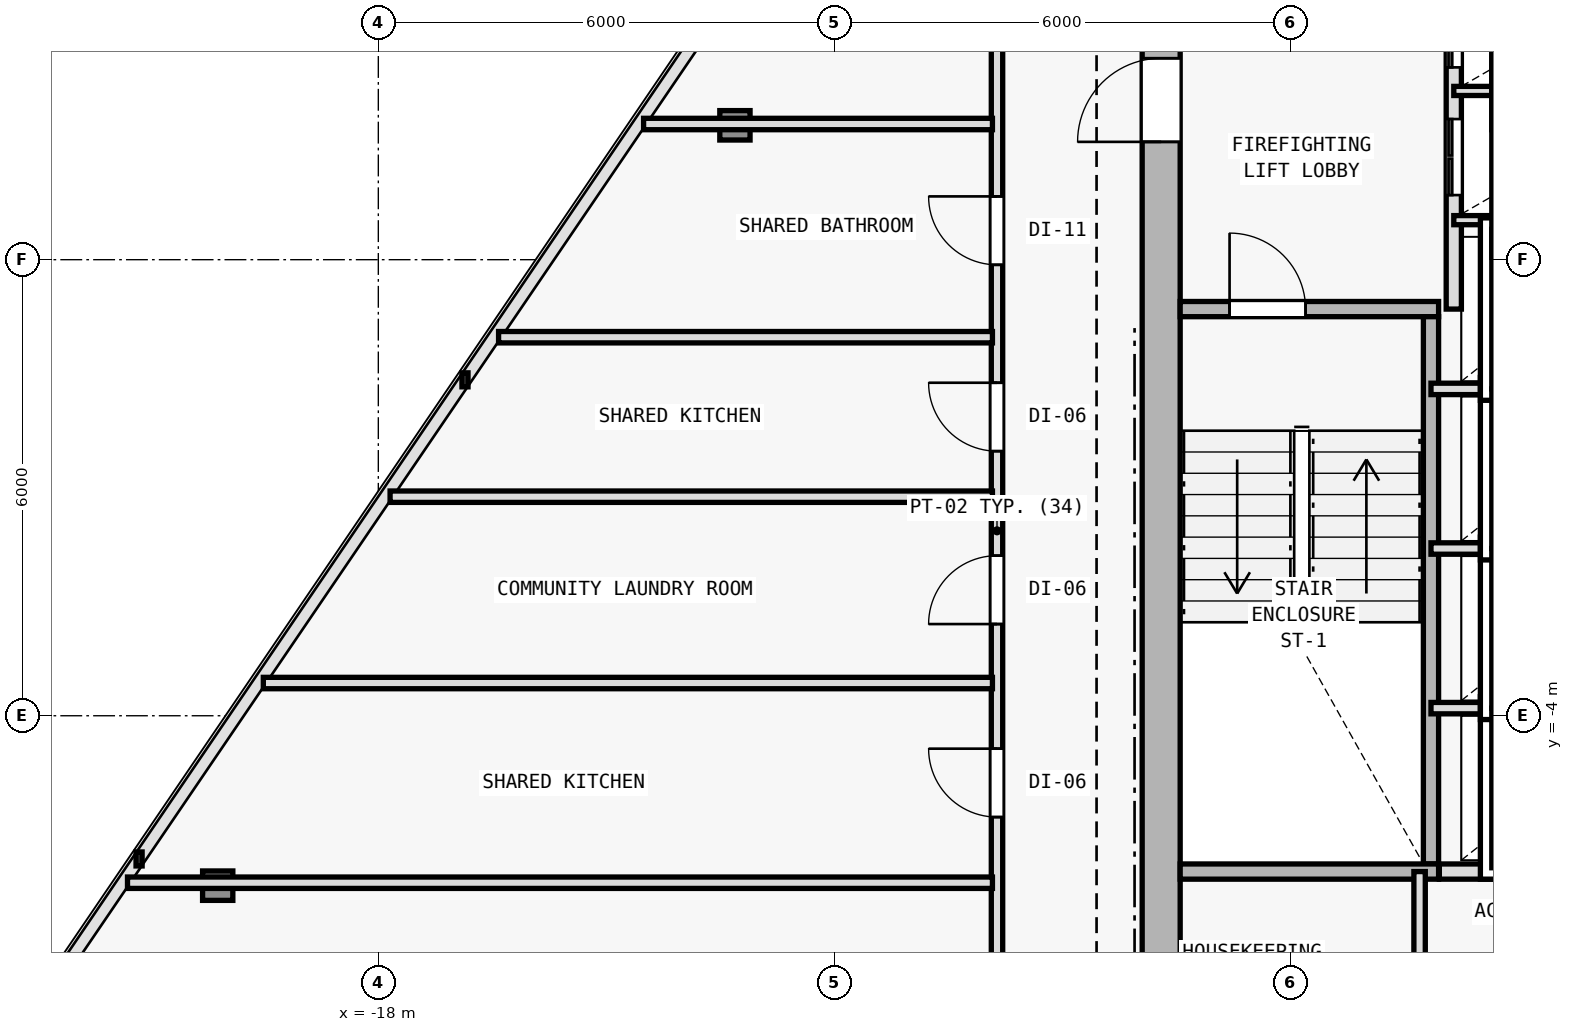
"""IFC4 building model, lengths in metres.
Left out: names, types, materials, properties, quantities, classifications, styles, units other than length and angle.
Written with IfcOpenShell. Run it as: python <this file> out.ifc"""

import sys

from ifc_helpers import new_model, si_unit, direction, frame, frame_2d, origin, origin_2d, place, context, subcontext, project, spatial, rectangle, i_section, extrude, element, fill, save


model = new_model("IFC4")
c1 = context("Model", 3, precision=1e-05, world=origin(), true_north=direction((0.0, 1.0)))
c2 = subcontext(c1, "Body", "Model", "MODEL_VIEW")
j1 = project(units=[si_unit("LENGTHUNIT", "METRE"), si_unit("PLANEANGLEUNIT", "RADIAN")], contexts=[c1])
p1 = place(None, origin())
s1 = spatial("IfcSite", under=j1, at=p1, CompositionType="ELEMENT")
p2 = place(p1, origin())
s2 = spatial("IfcBuilding", under=s1, at=p2, CompositionType="ELEMENT")
p3 = place(p2, frame((0.0, 0.0, 201.9)))
s3 = spatial("IfcBuildingStorey", under=s2, at=p3, CompositionType="ELEMENT", Elevation=201.9)
p4 = place(p3, frame((-7.7, 2.0, 0.0), z_axis=(0.0, 0.0, 1.0), x_axis=(1.0, 0.0, 0.0)))
e1 = element("IfcColumn", 1, at=p4, inside=s3, PredefinedType="COLUMN", context=c2, shape_type="SweptSolid", body=[
    extrude(i_section(OverallWidth=0.398, OverallDepth=0.387, WebThickness=0.013, FlangeThickness=0.022, FilletRadius=0.015, at=origin_2d()), origin(), (0.0, 0.0, 1.0), 3.6),
])
p5 = place(p3, frame((-13.308, 3.768, 0.006), z_axis=(0.017071567417, 0.009521989794, 0.999808928394), x_axis=(-0.487119351792, 0.873335409284, 0.0)))
e2 = element("IfcColumn", 2, at=p5, inside=s3, PredefinedType="COLUMN", context=c2, shape_type="SweptSolid", body=[
    extrude(i_section(OverallWidth=0.398, OverallDepth=0.387, WebThickness=0.013, FlangeThickness=0.022, FilletRadius=0.015, at=origin_2d()), origin(), (0.0, 0.0, 1.0), 3.59),
])
p6 = place(p3, frame((-20.113, -6.236, 0.006), z_axis=(0.025224163578, 0.021620711639, 0.999447990843), x_axis=(-0.650791373456, 0.759256602365, 0.0)))
e3 = element("IfcColumn", 3, at=p6, inside=s3, PredefinedType="COLUMN", context=c2, shape_type="SweptSolid", body=[
    extrude(i_section(OverallWidth=0.398, OverallDepth=0.387, WebThickness=0.013, FlangeThickness=0.022, FilletRadius=0.015, at=origin_2d()), origin(), (0.0, 0.0, 1.0), 3.591),
])
p7 = place(p3, frame((-7.7, -9.15, 0.0), z_axis=(0.0, 0.0, 1.0), x_axis=(0.0, 1.0, 0.0)))
e4 = element("IfcWall", 4, at=p7, inside=s3, PredefinedType="SHEAR", context=c2, shape_type="SweptSolid", body=[
    extrude(rectangle(XDim=19.1, YDim=0.5, at=frame_2d((9.55, 0.0))), origin(), (0.0, 0.0, 1.0), 3.35),
])
p8 = place(p7, frame((12.7, 0.0, 0.0)))
e5 = element("IfcOpeningElement", 5, at=p8, cuts=e4, PredefinedType="OPENING", context=c2, shape_type="SweptSolid", body=[
    extrude(rectangle(XDim=1.1, YDim=2.15, at=frame_2d((0.55, 1.075))), frame((0.0, 0.26, 0.0), z_axis=(0.0, -1.0, 0.0), x_axis=(1.0, 0.0, 0.0)), (0.0, 0.0, 1.0), 0.52),
])
p9 = place(p3, frame((-7.45, 1.35, 0.0), z_axis=(0.0, 0.0, 1.0), x_axis=(1.0, 0.0, 0.0)))
e6 = element("IfcWall", 6, at=p9, inside=s3, PredefinedType="SOLIDWALL", context=c2, shape_type="SweptSolid", body=[
    extrude(rectangle(XDim=3.4, YDim=0.2, at=frame_2d((1.7, 0.0))), origin(), (0.0, 0.0, 1.0), 3.35),
])
p10 = place(p9, frame((0.65, 0.0, 0.0)))
e7 = element("IfcOpeningElement", 7, at=p10, cuts=e6, PredefinedType="OPENING", context=c2, shape_type="SweptSolid", body=[
    extrude(rectangle(XDim=1.0, YDim=2.15, at=frame_2d((0.5, 1.075))), frame((0.0, 0.11, 0.0), z_axis=(0.0, -1.0, 0.0), x_axis=(1.0, 0.0, 0.0)), (0.0, 0.0, 1.0), 0.22),
])
p11 = place(p3, frame((-4.15, -5.95, 0.0), z_axis=(0.0, 0.0, 1.0), x_axis=(0.0, 1.0, 0.0)))
e8 = element("IfcWall", 8, at=p11, inside=s3, PredefinedType="SOLIDWALL", context=c2, shape_type="SweptSolid", body=[
    extrude(rectangle(XDim=7.2, YDim=0.2, at=frame_2d((3.6, 0.0))), origin(), (0.0, 0.0, 1.0), 3.35),
])
p12 = place(p3, frame((-3.85, 1.35, 0.0), z_axis=(0.0, 0.0, 1.0), x_axis=(0.0, 1.0, 0.0)))
e9 = element("IfcWall", 9, at=p12, inside=s3, PredefinedType="SOLIDWALL", context=c2, shape_type="SweptSolid", body=[
    extrude(rectangle(XDim=8.595, YDim=0.2, at=frame_2d((4.297, 0.0))), origin(), (0.0, 0.0, 1.0), 3.35),
])
p13 = place(p12, frame((1.5, 0.0, 0.0)))
e10 = element("IfcOpeningElement", 10, at=p13, cuts=e9, PredefinedType="OPENING", context=c2, shape_type="SweptSolid", body=[
    extrude(rectangle(XDim=1.0, YDim=2.15, at=frame_2d((0.5, 1.075))), frame((0.0, 0.11, 0.0), z_axis=(0.0, -1.0, 0.0), x_axis=(1.0, 0.0, 0.0)), (0.0, 0.0, 1.0), 0.22),
])
p14 = place(p12, frame((3.18, 0.0, 0.0)))
e11 = element("IfcOpeningElement", 11, at=p14, cuts=e9, PredefinedType="OPENING", context=c2, shape_type="SweptSolid", body=[
    extrude(rectangle(XDim=1.0, YDim=2.15, at=frame_2d((0.5, 1.075))), frame((0.0, 0.11, 0.0), z_axis=(0.0, -1.0, 0.0), x_axis=(1.0, 0.0, 0.0)), (0.0, 0.0, 1.0), 0.22),
])
for number, where, z_axis, x_axis in (
    (12, (-3.85, 2.52, 0.0), (0.0, 0.0, 1.0), (1.0, 0.0, 0.0)),
    (13, (-3.85, 4.22, 0.0), (0.0, 0.0, 1.0), (1.0, 0.0, 0.0)),
):
    element("IfcWall", number, at=place(p3, frame(where, z_axis=z_axis, x_axis=x_axis)), inside=s3, PredefinedType="PARTITIONING", context=c2, shape_type="SweptSolid", body=[
        extrude(rectangle(XDim=2.9, YDim=0.12, at=frame_2d((1.45, 0.0))), origin(), (0.0, 0.0, 1.0), 3.35),
    ])
for number, where, z_axis, x_axis in (
    (14, (-4.15, -3.9, 0.0), (0.0, 0.0, 1.0), (1.0, 0.0, 0.0)),
    (15, (-4.15, -1.8, 0.0), (0.0, 0.0, 1.0), (1.0, 0.0, 0.0)),
    (16, (-4.15, 0.3, 0.0), (0.0, 0.0, 1.0), (1.0, 0.0, 0.0)),
):
    element("IfcWall", number, at=place(p3, frame(where, z_axis=z_axis, x_axis=x_axis)), inside=s3, PredefinedType="PARTITIONING", context=c2, shape_type="SweptSolid", body=[
        extrude(rectangle(XDim=2.9, YDim=0.15, at=frame_2d((1.45, 0.0))), origin(), (0.0, 0.0, 1.0), 3.35),
    ])
p15 = place(p3, frame((-7.45, -6.05, 0.0), z_axis=(0.0, 0.0, 1.0), x_axis=(1.0, 0.0, 0.0)))
e17 = element("IfcWall", 17, at=p15, inside=s3, PredefinedType="SOLIDWALL", context=c2, shape_type="SweptSolid", body=[
    extrude(rectangle(XDim=3.4, YDim=0.2, at=frame_2d((1.7, 0.0))), origin(), (0.0, 0.0, 1.0), 3.35),
])
p16 = place(p3, frame((-4.04, -6.05, 0.0), z_axis=(0.0, 0.0, 1.0), x_axis=(1.0, 0.0, 0.0)))
e18 = element("IfcWall", 18, at=p16, inside=s3, PredefinedType="SOLIDWALL", context=c2, shape_type="SweptSolid", body=[
    extrude(rectangle(XDim=2.79, YDim=0.2, at=frame_2d((1.395, 0.0))), origin(), (0.0, 0.0, 1.0), 3.35),
])
p17 = place(p3, frame((-4.3, -9.145, 0.0), z_axis=(0.0, 0.0, 1.0), x_axis=(0.0, 1.0, 0.0)))
e19 = element("IfcWall", 19, at=p17, inside=s3, PredefinedType="PARTITIONING", context=c2, shape_type="SweptSolid", body=[
    extrude(rectangle(XDim=3.095, YDim=0.15, at=frame_2d((1.547, 0.0))), origin(), (0.0, 0.0, 1.0), 3.35),
])
p18 = place(p17, frame((0.845, 0.0, 0.0)))
e20 = element("IfcOpeningElement", 20, at=p18, cuts=e19, PredefinedType="OPENING", context=c2, shape_type="SweptSolid", body=[
    extrude(rectangle(XDim=0.9, YDim=2.1, at=frame_2d((0.45, 1.05))), frame((0.0, 0.085, 0.0), z_axis=(0.0, -1.0, 0.0), x_axis=(1.0, 0.0, 0.0)), (0.0, 0.0, 1.0), 0.17),
])
p19 = place(p3, frame((-9.86, -11.56, 0.0), z_axis=(0.0, 0.0, 1.0), x_axis=(0.0, 1.0, 0.0)))
e21 = element("IfcWall", 21, at=p19, inside=s3, PredefinedType="PARTITIONING", context=c2, shape_type="SweptSolid", body=[
    extrude(rectangle(XDim=19.986, YDim=0.15, at=frame_2d((9.993, 0.0))), origin(), (0.0, 0.0, 1.0), 2.775),
])
p20 = place(p19, frame((11.041, 0.0, 0.0)))
e22 = element("IfcOpeningElement", 22, at=p20, cuts=e21, PredefinedType="OPENING", context=c2, shape_type="SweptSolid", body=[
    extrude(rectangle(XDim=0.9, YDim=2.1, at=frame_2d((0.45, 1.05))), frame((0.0, 0.085, 0.0), z_axis=(0.0, -1.0, 0.0), x_axis=(1.0, 0.0, 0.0)), (0.0, 0.0, 1.0), 0.17),
])
p21 = place(p19, frame((8.766, 0.0, 0.0)))
e23 = element("IfcOpeningElement", 23, at=p21, cuts=e21, PredefinedType="OPENING", context=c2, shape_type="SweptSolid", body=[
    extrude(rectangle(XDim=0.9, YDim=2.1, at=frame_2d((0.45, 1.05))), frame((0.0, 0.085, 0.0), z_axis=(0.0, -1.0, 0.0), x_axis=(1.0, 0.0, 0.0)), (0.0, 0.0, 1.0), 0.17),
])
p22 = place(p19, frame((6.227, 0.0, 0.0)))
e24 = element("IfcOpeningElement", 24, at=p22, cuts=e21, PredefinedType="OPENING", context=c2, shape_type="SweptSolid", body=[
    extrude(rectangle(XDim=0.9, YDim=2.1, at=frame_2d((0.45, 1.05))), frame((0.0, 0.085, 0.0), z_axis=(0.0, -1.0, 0.0), x_axis=(1.0, 0.0, 0.0)), (0.0, 0.0, 1.0), 0.17),
])
p23 = place(p19, frame((2.321, 0.0, 0.0)))
e25 = element("IfcOpeningElement", 25, at=p23, cuts=e21, PredefinedType="OPENING", context=c2, shape_type="SweptSolid", body=[
    extrude(rectangle(XDim=0.9, YDim=2.1, at=frame_2d((0.45, 1.05))), frame((0.0, 0.085, 0.0), z_axis=(0.0, -1.0, 0.0), x_axis=(1.0, 0.0, 0.0)), (0.0, 0.0, 1.0), 0.17),
])
p24 = place(p19, frame((13.492, 0.0, 0.0)))
e26 = element("IfcOpeningElement", 26, at=p24, cuts=e21, PredefinedType="OPENING", context=c2, shape_type="SweptSolid", body=[
    extrude(rectangle(XDim=0.9, YDim=2.1, at=frame_2d((0.45, 1.05))), frame((0.0, 0.085, 0.0), z_axis=(0.0, -1.0, 0.0), x_axis=(1.0, 0.0, 0.0)), (0.0, 0.0, 1.0), 0.17),
])
p25 = place(p3, frame((-9.92, 3.785, 0.0), z_axis=(0.0, 0.0, 1.0), x_axis=(-1.0, 0.0, 0.0)))
e27 = element("IfcWall", 27, at=p25, inside=s3, PredefinedType="PARTITIONING", context=c2, shape_type="SweptSolid", body=[
    extrude(rectangle(XDim=4.59, YDim=0.15, at=frame_2d((2.295, 0.0))), origin(), (0.0, 0.0, 1.0), 2.935),
])
p26 = place(p3, frame((-9.92, -6.197, 0.0), z_axis=(0.0, 0.0, 1.0), x_axis=(-1.0, 0.0, 0.0)))
e28 = element("IfcWall", 28, at=p26, inside=s3, PredefinedType="PARTITIONING", context=c2, shape_type="SweptSolid", body=[
    extrude(rectangle(XDim=11.38, YDim=0.15, at=frame_2d((5.69, 0.0))), origin(), (0.0, 0.0, 1.0), 2.725),
])
p27 = place(p3, frame((-9.92, -1.118, 0.0), z_axis=(0.0, 0.0, 1.0), x_axis=(-1.0, 0.0, 0.0)))
e29 = element("IfcWall", 29, at=p27, inside=s3, PredefinedType="PARTITIONING", context=c2, shape_type="SweptSolid", body=[
    extrude(rectangle(XDim=7.925, YDim=0.15, at=frame_2d((3.963, 0.0))), origin(), (0.0, 0.0, 1.0), 2.725),
])
p28 = place(p3, frame((-9.92, -3.57, 0.0), z_axis=(0.0, 0.0, 1.0), x_axis=(-1.0, 0.0, 0.0)))
e30 = element("IfcWall", 30, at=p28, inside=s3, PredefinedType="PARTITIONING", context=c2, shape_type="SweptSolid", body=[
    extrude(rectangle(XDim=9.593, YDim=0.15, at=frame_2d((4.796, 0.0))), origin(), (0.0, 0.0, 1.0), 2.725),
])
p29 = place(p3, frame((-9.92, 0.98, 0.0), z_axis=(0.0, 0.0, 1.0), x_axis=(-1.0, 0.0, 0.0)))
e31 = element("IfcWall", 31, at=p29, inside=s3, PredefinedType="PARTITIONING", context=c2, shape_type="SweptSolid", body=[
    extrude(rectangle(XDim=6.498, YDim=0.15, at=frame_2d((3.249, 0.0))), origin(), (0.0, 0.0, 1.0), 2.725),
])
p30 = place(p8, origin())
e32 = element("IfcDoor", 32, at=p30, inside=s3, OperationType="SINGLE_SWING_LEFT", PredefinedType="DOOR", context=c2, shape_type="SweptSolid", body=[
    extrude(rectangle(XDim=1.1, YDim=2.15, at=frame_2d((0.55, 1.075))), frame((0.0, 0.025, 0.0), z_axis=(0.0, -1.0, 0.0), x_axis=(1.0, 0.0, 0.0)), (0.0, 0.0, 1.0), 0.05),
])
fill(e5, e32)
p31 = place(p10, origin())
e33 = element("IfcDoor", 33, at=p31, inside=s3, OperationType="SINGLE_SWING_LEFT", PredefinedType="DOOR", context=c2, shape_type="SweptSolid", body=[
    extrude(rectangle(XDim=1.0, YDim=2.15, at=frame_2d((0.5, 1.075))), frame((0.0, 0.025, 0.0), z_axis=(0.0, -1.0, 0.0), x_axis=(1.0, 0.0, 0.0)), (0.0, 0.0, 1.0), 0.05),
])
fill(e7, e33)
p32 = place(p13, origin())
e34 = element("IfcDoor", 34, at=p32, inside=s3, OperationType="DOUBLE_DOOR_SLIDING", PredefinedType="DOOR", context=c2, shape_type="SweptSolid", body=[
    extrude(rectangle(XDim=1.0, YDim=2.15, at=frame_2d((0.5, 1.075))), frame((0.0, 0.025, 0.0), z_axis=(0.0, -1.0, 0.0), x_axis=(1.0, 0.0, 0.0)), (0.0, 0.0, 1.0), 0.05),
])
fill(e10, e34)
p33 = place(p14, origin())
e35 = element("IfcDoor", 35, at=p33, inside=s3, OperationType="DOUBLE_DOOR_SLIDING", PredefinedType="DOOR", context=c2, shape_type="SweptSolid", body=[
    extrude(rectangle(XDim=1.0, YDim=2.15, at=frame_2d((0.5, 1.075))), frame((0.0, 0.025, 0.0), z_axis=(0.0, -1.0, 0.0), x_axis=(1.0, 0.0, 0.0)), (0.0, 0.0, 1.0), 0.05),
])
fill(e11, e35)
p34 = place(p20, origin())
e36 = element("IfcDoor", 36, at=p34, inside=s3, OperationType="SINGLE_SWING_RIGHT", PredefinedType="DOOR", context=c2, shape_type="SweptSolid", body=[
    extrude(rectangle(XDim=0.9, YDim=2.1, at=frame_2d((0.45, 1.05))), frame((0.0, 0.025, 0.0), z_axis=(0.0, -1.0, 0.0), x_axis=(1.0, 0.0, 0.0)), (0.0, 0.0, 1.0), 0.05),
])
fill(e22, e36)
p35 = place(p21, origin())
e37 = element("IfcDoor", 37, at=p35, inside=s3, OperationType="SINGLE_SWING_LEFT", PredefinedType="DOOR", context=c2, shape_type="SweptSolid", body=[
    extrude(rectangle(XDim=0.9, YDim=2.1, at=frame_2d((0.45, 1.05))), frame((0.0, 0.025, 0.0), z_axis=(0.0, -1.0, 0.0), x_axis=(1.0, 0.0, 0.0)), (0.0, 0.0, 1.0), 0.05),
])
fill(e23, e37)
p36 = place(p22, origin())
e38 = element("IfcDoor", 38, at=p36, inside=s3, OperationType="SINGLE_SWING_RIGHT", PredefinedType="DOOR", context=c2, shape_type="SweptSolid", body=[
    extrude(rectangle(XDim=0.9, YDim=2.1, at=frame_2d((0.45, 1.05))), frame((0.0, 0.025, 0.0), z_axis=(0.0, -1.0, 0.0), x_axis=(1.0, 0.0, 0.0)), (0.0, 0.0, 1.0), 0.05),
])
fill(e24, e38)
p37 = place(p24, origin())
e39 = element("IfcDoor", 39, at=p37, inside=s3, OperationType="SINGLE_SWING_RIGHT", PredefinedType="DOOR", context=c2, shape_type="SweptSolid", body=[
    extrude(rectangle(XDim=0.9, YDim=2.1, at=frame_2d((0.45, 1.05))), frame((0.0, 0.025, 0.0), z_axis=(0.0, -1.0, 0.0), x_axis=(1.0, 0.0, 0.0)), (0.0, 0.0, 1.0), 0.05),
])
fill(e26, e39)
save(model, sys.argv[1])
